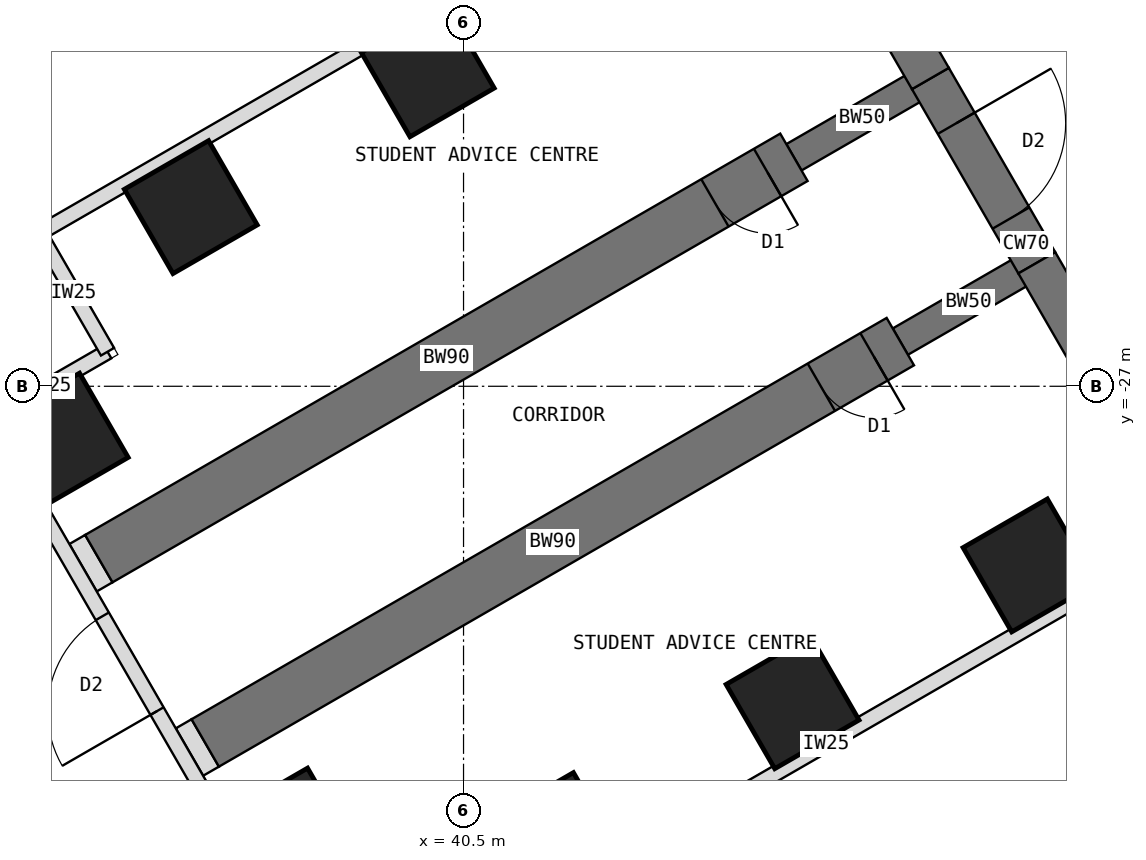
"""IFC4 building model, lengths in metres.
Left out: names, types, materials, properties, quantities, classifications, styles, units other than length and angle.
Written with IfcOpenShell. Run it as: python <this file> out.ifc"""

import sys

from ifc_helpers import new_model, si_unit, direction, frame, frame_2d, origin, origin_2d, place, context, subcontext, project, spatial, rectangle, extrude, element, fill, save


model = new_model("IFC4")
c1 = context("Model", 3, precision=1e-05, world=origin(), true_north=direction((0.0, 1.0)))
c2 = subcontext(c1, "Body", "Model", "MODEL_VIEW")
j1 = project(units=[si_unit("LENGTHUNIT", "METRE"), si_unit("PLANEANGLEUNIT", "RADIAN")], contexts=[c1])
p1 = place(None, origin())
s1 = spatial("IfcSite", under=j1, at=p1, CompositionType="ELEMENT")
p2 = place(p1, origin())
s2 = spatial("IfcBuilding", under=s1, at=p2, CompositionType="ELEMENT")
p3 = place(p2, origin())
s3 = spatial("IfcBuildingStorey", under=s2, at=p3, CompositionType="ELEMENT", Elevation=0.0)
p4 = place(p3, frame((45.904, -18.0, 0.0), z_axis=(0.0, 0.0, 1.0), x_axis=(0.500024481964, -0.866011268655, 0.0)))
e1 = element("IfcWall", 1, at=p4, inside=s3, PredefinedType="SHEAR", context=c2, shape_type="SweptSolid", body=[
    extrude(rectangle(XDim=4.548, YDim=0.7, at=frame_2d((2.274, 0.0))), origin(), (0.0, 0.0, 1.0), 5.5),
])
p5 = place(p3, frame((48.178, -21.939, 0.0), z_axis=(0.0, 0.0, 1.0), x_axis=(0.500010275428, -0.866019471182, 0.0)))
e2 = element("IfcWall", 2, at=p5, inside=s3, PredefinedType="SHEAR", context=c2, shape_type="SweptSolid", body=[
    extrude(rectangle(XDim=3.5, YDim=0.7, at=frame_2d((1.75, 0.0))), origin(), (0.0, 0.0, 1.0), 5.5),
])
p6 = place(p5, frame((0.85, 0.0, 0.0)))
e3 = element("IfcOpeningElement", 3, at=p6, cuts=e2, PredefinedType="OPENING", context=c2, shape_type="SweptSolid", body=[
    extrude(rectangle(XDim=1.8, YDim=2.1, at=frame_2d((0.9, 1.05))), frame((0.0, 0.36, 0.0), z_axis=(0.0, -1.0, 0.0), x_axis=(1.0, 0.0, 0.0)), (0.0, 0.0, 1.0), 0.72),
])
p7 = place(p3, frame((49.928, -24.97, 0.0), z_axis=(0.0, 0.0, 1.0), x_axis=(0.499984222037, -0.866034513004, 0.0)))
e4 = element("IfcWall", 4, at=p7, inside=s3, PredefinedType="SHEAR", context=c2, shape_type="SweptSolid", body=[
    extrude(rectangle(XDim=4.548, YDim=0.7, at=frame_2d((2.274, 0.0))), origin(), (0.0, 0.0, 1.0), 5.5),
])
p8 = place(p3, frame((49.928, -24.97, 0.0), z_axis=(0.0, 0.0, 1.0), x_axis=(-0.866031863473, -0.499988811324, 0.0)))
e5 = element("IfcWall", 5, at=p8, inside=s3, PredefinedType="SHEAR", context=c2, shape_type="SweptSolid", body=[
    extrude(rectangle(XDim=2.592, YDim=0.5, at=frame_2d((1.296, 0.0))), origin(), (0.0, 0.0, 1.0), 5.5),
])
p9 = place(p3, frame((47.684, -26.266, 0.0), z_axis=(0.0, 0.0, 1.0), x_axis=(-0.866027579429, -0.499996231654, 0.0)))
e6 = element("IfcWall", 6, at=p9, inside=s3, PredefinedType="SHEAR", context=c2, shape_type="SweptSolid", body=[
    extrude(rectangle(XDim=13.2, YDim=0.9, at=frame_2d((6.6, 0.0))), origin(), (0.0, 0.0, 1.0), 5.5),
])
p10 = place(p9, frame((0.5, 0.0, 0.0)))
e7 = element("IfcOpeningElement", 7, at=p10, cuts=e6, PredefinedType="OPENING", context=c2, shape_type="SweptSolid", body=[
    extrude(rectangle(XDim=1.0, YDim=2.1, at=frame_2d((0.5, 1.05))), frame((0.0, 0.46, 0.0), z_axis=(0.0, -1.0, 0.0), x_axis=(1.0, 0.0, 0.0)), (0.0, 0.0, 1.0), 0.92),
])
p11 = place(p3, frame((48.178, -21.939, 0.0), z_axis=(0.0, 0.0, 1.0), x_axis=(-0.866072649678, -0.499918158782, 0.0)))
e8 = element("IfcWall", 8, at=p11, inside=s3, PredefinedType="SHEAR", context=c2, shape_type="SweptSolid", body=[
    extrude(rectangle(XDim=2.592, YDim=0.5, at=frame_2d((1.296, 0.0))), origin(), (0.0, 0.0, 1.0), 5.5),
])
p12 = place(p3, frame((45.934, -23.234, 0.0), z_axis=(0.0, 0.0, 1.0), x_axis=(-0.866019570528, -0.500010103361, 0.0)))
e9 = element("IfcWall", 9, at=p12, inside=s3, PredefinedType="SHEAR", context=c2, shape_type="SweptSolid", body=[
    extrude(rectangle(XDim=13.2, YDim=0.9, at=frame_2d((6.6, 0.0))), origin(), (0.0, 0.0, 1.0), 5.5),
])
p13 = place(p12, frame((0.5, 0.0, 0.0)))
e10 = element("IfcOpeningElement", 10, at=p13, cuts=e9, PredefinedType="OPENING", context=c2, shape_type="SweptSolid", body=[
    extrude(rectangle(XDim=1.0, YDim=2.1, at=frame_2d((0.5, 1.05))), frame((0.0, 0.46, 0.0), z_axis=(0.0, -1.0, 0.0), x_axis=(1.0, 0.0, 0.0)), (0.0, 0.0, 1.0), 0.92),
])
for number, where, z_axis, x_axis in (
    (11, (49.809, -29.946, 0.0), (0.0, 0.0, 1.0), (0.866, 0.5, 0.0)),
    (12, (45.912, -32.196, 0.0), (0.0, 0.0, 1.0), (0.866, 0.5, 0.0)),
    (13, (39.912, -21.804, 0.0), (0.0, 0.0, 1.0), (0.866, 0.5, 0.0)),
    (14, (42.014, -34.446, 0.0), (0.0, 0.0, 1.0), (0.866, 0.5, 0.0)),
    (15, (36.014, -24.054, 0.0), (0.0, 0.0, 1.0), (0.866, 0.5, 0.0)),
    (16, (37.642, -34.373, 0.0), (0.0, 0.0, 1.0), (0.866, 0.5, 0.0)),
    (17, (33.892, -27.877, 0.0), (0.0, 0.0, 1.0), (0.866, 0.5, 0.0)),
):
    element("IfcColumn", number, at=place(p3, frame(where, z_axis=z_axis, x_axis=x_axis)), inside=s3, PredefinedType="COLUMN", context=c2, shape_type="SweptSolid", body=[
        extrude(rectangle(XDim=1.6, YDim=1.6, at=origin_2d()), origin(), (0.0, 0.0, 1.0), 5.5),
    ])
p14 = place(p3, frame((36.252, -32.865, 0.0), z_axis=(0.0, 0.0, 1.0), x_axis=(-0.865778900179, -0.500426713919, 0.0)))
e18 = element("IfcWall", 18, at=p14, inside=s3, PredefinedType="PARTITIONING", context=c2, shape_type="SweptSolid", body=[
    extrude(rectangle(XDim=0.3, YDim=0.9, at=frame_2d((0.15, 0.0))), origin(), (0.0, 0.0, 1.0), 5.15),
])
p15 = place(p3, frame((34.502, -29.834, 0.0), z_axis=(0.0, 0.0, 1.0), x_axis=(-0.866131372301, -0.499816412211, 0.0)))
e19 = element("IfcWall", 19, at=p15, inside=s3, PredefinedType="PARTITIONING", context=c2, shape_type="SweptSolid", body=[
    extrude(rectangle(XDim=0.3, YDim=0.9, at=frame_2d((0.15, 0.0))), origin(), (0.0, 0.0, 1.0), 5.15),
])
p16 = place(p3, frame((52.533, -29.383, 0.0), z_axis=(0.0, 0.0, 1.0), x_axis=(-0.866027500821, -0.499996367808, 0.0)))
e20 = element("IfcWall", 20, at=p16, inside=s3, PredefinedType="STANDARD", context=c2, shape_type="SweptSolid", body=[
    extrude(rectangle(XDim=14.016, YDim=0.25, at=frame_2d((7.008, 0.0))), origin(), (0.0, 0.0, 1.0), 5.15),
])
p17 = place(p3, frame((37.322, -35.568, 0.0), z_axis=(0.0, 0.0, 1.0), x_axis=(-0.499999662836, 0.866025598446, 0.0)))
e21 = element("IfcWall", 21, at=p17, inside=s3, PredefinedType="STANDARD", context=c2, shape_type="SweptSolid", body=[
    extrude(rectangle(XDim=9.25, YDim=0.25, at=frame_2d((4.625, 0.0))), origin(), (0.0, 0.0, 1.0), 5.15),
])
p18 = place(p17, frame((3.725, 0.0, 0.0)))
e22 = element("IfcOpeningElement", 22, at=p18, cuts=e21, PredefinedType="OPENING", context=c2, shape_type="SweptSolid", body=[
    extrude(rectangle(XDim=1.8, YDim=2.1, at=frame_2d((0.9, 1.05))), frame((0.0, 0.135, 0.0), z_axis=(0.0, -1.0, 0.0), x_axis=(1.0, 0.0, 0.0)), (0.0, 0.0, 1.0), 0.27),
])
for number, where, z_axis, x_axis in (
    (23, (32.697, -27.557, 0.0), (0.0, 0.0, 1.0), (0.866, 0.5, 0.0)),
    (24, (34.645, -26.432, 0.0), (0.0, 0.0, 1.0), (-0.5, 0.866, 0.0)),
):
    element("IfcWall", number, at=place(p3, frame(where, z_axis=z_axis, x_axis=x_axis)), inside=s3, PredefinedType="STANDARD", context=c2, shape_type="SweptSolid", body=[
        extrude(rectangle(XDim=2.25, YDim=0.25, at=frame_2d((1.125, 0.0))), origin(), (0.0, 0.0, 1.0), 5.15),
    ])
p19 = place(p3, frame((33.52, -24.484, 0.0), z_axis=(0.0, 0.0, 1.0), x_axis=(0.866027500821, 0.499996367808, 0.0)))
e25 = element("IfcWall", 25, at=p19, inside=s3, PredefinedType="STANDARD", context=c2, shape_type="SweptSolid", body=[
    extrude(rectangle(XDim=14.016, YDim=0.25, at=frame_2d((7.008, 0.0))), origin(), (0.0, 0.0, 1.0), 5.15),
])
p20 = place(p6, origin())
e26 = element("IfcDoor", 26, at=p20, inside=s3, OperationType="DOUBLE_DOOR_DOUBLE_SWING", PredefinedType="DOOR", context=c2, shape_type="SweptSolid", body=[
    extrude(rectangle(XDim=1.72, YDim=2.06, at=frame_2d((0.9, 1.03))), frame((0.0, 0.025, 0.0), z_axis=(0.0, -1.0, 0.0), x_axis=(1.0, 0.0, 0.0)), (0.0, 0.0, 1.0), 0.05),
    extrude(rectangle(XDim=0.04, YDim=2.1, at=frame_2d((0.02, 1.05))), frame((0.0, 0.35, 0.0), z_axis=(0.0, -1.0, 0.0), x_axis=(1.0, 0.0, 0.0)), (0.0, 0.0, 1.0), 0.699),
    extrude(rectangle(XDim=0.04, YDim=2.1, at=frame_2d((1.78, 1.05))), frame((0.0, 0.35, 0.0), z_axis=(0.0, -1.0, 0.0), x_axis=(1.0, 0.0, 0.0)), (0.0, 0.0, 1.0), 0.699),
    extrude(rectangle(XDim=1.72, YDim=0.04, at=frame_2d((0.9, 2.08))), frame((0.0, 0.35, 0.0), z_axis=(0.0, -1.0, 0.0), x_axis=(1.0, 0.0, 0.0)), (0.0, 0.0, 1.0), 0.699),
])
fill(e3, e26)
p21 = place(p10, origin())
e27 = element("IfcDoor", 27, at=p21, inside=s3, OperationType="SINGLE_SWING_LEFT", PredefinedType="DOOR", context=c2, shape_type="SweptSolid", body=[
    extrude(rectangle(XDim=0.92, YDim=2.06, at=frame_2d((0.5, 1.03))), frame((0.0, 0.025, 0.0), z_axis=(0.0, -1.0, 0.0), x_axis=(1.0, 0.0, 0.0)), (0.0, 0.0, 1.0), 0.05),
    extrude(rectangle(XDim=0.04, YDim=2.1, at=frame_2d((0.02, 1.05))), frame((0.0, 0.45, 0.0), z_axis=(0.0, -1.0, 0.0), x_axis=(1.0, 0.0, 0.0)), (0.0, 0.0, 1.0), 0.899),
    extrude(rectangle(XDim=0.04, YDim=2.1, at=frame_2d((0.98, 1.05))), frame((0.0, 0.45, 0.0), z_axis=(0.0, -1.0, 0.0), x_axis=(1.0, 0.0, 0.0)), (0.0, 0.0, 1.0), 0.899),
    extrude(rectangle(XDim=0.92, YDim=0.04, at=frame_2d((0.5, 2.08))), frame((0.0, 0.45, 0.0), z_axis=(0.0, -1.0, 0.0), x_axis=(1.0, 0.0, 0.0)), (0.0, 0.0, 1.0), 0.899),
])
fill(e7, e27)
p22 = place(p13, origin())
e28 = element("IfcDoor", 28, at=p22, inside=s3, OperationType="SINGLE_SWING_LEFT", PredefinedType="DOOR", context=c2, shape_type="SweptSolid", body=[
    extrude(rectangle(XDim=0.92, YDim=2.06, at=frame_2d((0.5, 1.03))), frame((0.0, 0.025, 0.0), z_axis=(0.0, -1.0, 0.0), x_axis=(1.0, 0.0, 0.0)), (0.0, 0.0, 1.0), 0.05),
    extrude(rectangle(XDim=0.04, YDim=2.1, at=frame_2d((0.02, 1.05))), frame((0.0, 0.45, 0.0), z_axis=(0.0, -1.0, 0.0), x_axis=(1.0, 0.0, 0.0)), (0.0, 0.0, 1.0), 0.899),
    extrude(rectangle(XDim=0.04, YDim=2.1, at=frame_2d((0.98, 1.05))), frame((0.0, 0.45, 0.0), z_axis=(0.0, -1.0, 0.0), x_axis=(1.0, 0.0, 0.0)), (0.0, 0.0, 1.0), 0.899),
    extrude(rectangle(XDim=0.92, YDim=0.04, at=frame_2d((0.5, 2.08))), frame((0.0, 0.45, 0.0), z_axis=(0.0, -1.0, 0.0), x_axis=(1.0, 0.0, 0.0)), (0.0, 0.0, 1.0), 0.899),
])
fill(e10, e28)
p23 = place(p18, origin())
e29 = element("IfcDoor", 29, at=p23, inside=s3, OperationType="DOUBLE_DOOR_DOUBLE_SWING", PredefinedType="DOOR", context=c2, shape_type="SweptSolid", body=[
    extrude(rectangle(XDim=1.8, YDim=2.1, at=frame_2d((0.9, 1.05))), frame((0.0, 0.025, 0.0), z_axis=(0.0, -1.0, 0.0), x_axis=(1.0, 0.0, 0.0)), (0.0, 0.0, 1.0), 0.05),
])
fill(e22, e29)
save(model, sys.argv[1])
